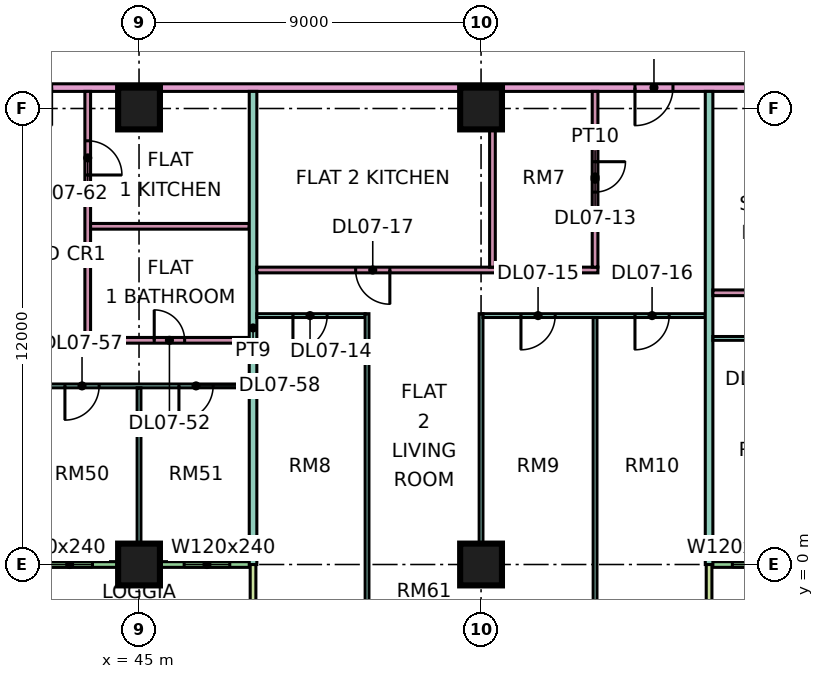
"""IFC4 building model, lengths in metres.
Left out: names, types, materials, properties, quantities, classifications, styles, units other than length and angle.
Written with IfcOpenShell. Run it as: python <this file> out.ifc"""

import sys

from ifc_helpers import new_model, si_unit, direction, frame, frame_2d, origin, origin_2d, place, context, subcontext, project, spatial, rectangle, extrude, element, fill, save


model = new_model("IFC4")
c1 = context("Model", 3, precision=1e-05, world=origin(), true_north=direction((0.0, 1.0)))
c2 = subcontext(c1, "Body", "Model", "MODEL_VIEW")
j1 = project(units=[si_unit("LENGTHUNIT", "METRE"), si_unit("PLANEANGLEUNIT", "RADIAN")], contexts=[c1])
p1 = place(None, origin())
s1 = spatial("IfcSite", under=j1, at=p1, CompositionType="ELEMENT")
p2 = place(p1, origin())
s2 = spatial("IfcBuilding", under=s1, at=p2, CompositionType="ELEMENT")
p3 = place(p2, frame((0.0, 0.0, 41.4)))
s3 = spatial("IfcBuildingStorey", under=s2, at=p3, CompositionType="ELEMENT", Elevation=41.4)
for number, where, z_axis, x_axis in (
    (1, (45.0, 0.0, 0.0), (0.0, 0.0, 1.0), (1.0, 0.0, 0.0)),
    (2, (45.0, 12.0, 0.0), (0.0, 0.0, 1.0), (1.0, 0.0, 0.0)),
    (3, (54.0, 0.0, 0.0), (0.0, 0.0, 1.0), (1.0, 0.0, 0.0)),
    (4, (54.0, 12.0, 0.0), (0.0, 0.0, 1.0), (1.0, 0.0, 0.0)),
):
    element("IfcColumn", number, at=place(p3, frame(where, z_axis=z_axis, x_axis=x_axis)), inside=s3, PredefinedType="COLUMN", context=c2, shape_type="SweptSolid", body=[
        extrude(rectangle(XDim=1.1, YDim=1.1, at=origin_2d()), origin(), (0.0, 0.0, 1.0), 3.75),
    ])
p4 = place(p3, frame((36.075, 0.0, 0.0), z_axis=(0.0, 0.0, 1.0), x_axis=(1.0, 0.0, 0.0)))
e5 = element("IfcWall", 5, at=p4, inside=s3, PredefinedType="SOLIDWALL", context=c2, shape_type="SweptSolid", body=[
    extrude(rectangle(XDim=11.85, YDim=0.15, at=frame_2d((5.925, 0.0))), origin(), (0.0, 0.0, 1.0), 3.35),
])
p5 = place(p4, frame((2.35, 0.0, 0.0)))
e6 = element("IfcOpeningElement", 6, at=p5, cuts=e5, PredefinedType="OPENING", context=c2, shape_type="SweptSolid", body=[
    extrude(rectangle(XDim=1.8, YDim=2.4, at=frame_2d((0.9, 1.2))), frame((0.0, 0.085, 0.0), z_axis=(0.0, -1.0, 0.0), x_axis=(1.0, 0.0, 0.0)), (0.0, 0.0, 1.0), 0.17),
])
p6 = place(p4, frame((6.5, 0.0, 0.45)))
e7 = element("IfcOpeningElement", 7, at=p6, cuts=e5, PredefinedType="OPENING", context=c2, shape_type="SweptSolid", body=[
    extrude(rectangle(XDim=1.2, YDim=2.4, at=frame_2d((0.6, 1.2))), frame((0.0, 0.085, 0.0), z_axis=(0.0, -1.0, 0.0), x_axis=(1.0, 0.0, 0.0)), (0.0, 0.0, 1.0), 0.17),
])
p7 = place(p4, frame((10.113, 0.0, 0.45)))
e8 = element("IfcOpeningElement", 8, at=p7, cuts=e5, PredefinedType="OPENING", context=c2, shape_type="SweptSolid", body=[
    extrude(rectangle(XDim=1.2, YDim=2.4, at=frame_2d((0.6, 1.2))), frame((0.0, 0.085, 0.0), z_axis=(0.0, -1.0, 0.0), x_axis=(1.0, 0.0, 0.0)), (0.0, 0.0, 1.0), 0.17),
])
p8 = place(p3, frame((48.0, -1.5, 0.0), z_axis=(0.0, 0.0, 1.0), x_axis=(0.0, 1.0, 0.0)))
e9 = element("IfcWall", 9, at=p8, inside=s3, PredefinedType="SOLIDWALL", context=c2, shape_type="SweptSolid", body=[
    extrude(rectangle(XDim=1.5, YDim=0.15, at=frame_2d((0.75, 0.0))), origin(), (0.0, 0.0, 1.0), 3.35),
])
p9 = place(p3, frame((60.075, 0.0, 0.0), z_axis=(0.0, 0.0, 1.0), x_axis=(1.0, 0.0, 0.0)))
e10 = element("IfcWall", 10, at=p9, inside=s3, PredefinedType="SOLIDWALL", context=c2, shape_type="SweptSolid", body=[
    extrude(rectangle(XDim=10.35, YDim=0.15, at=frame_2d((5.175, 0.0))), origin(), (0.0, 0.0, 1.0), 3.35),
])
p10 = place(p9, frame((0.538, 0.0, 0.45)))
e11 = element("IfcOpeningElement", 11, at=p10, cuts=e10, PredefinedType="OPENING", context=c2, shape_type="SweptSolid", body=[
    extrude(rectangle(XDim=1.2, YDim=2.4, at=frame_2d((0.6, 1.2))), frame((0.0, 0.085, 0.0), z_axis=(0.0, -1.0, 0.0), x_axis=(1.0, 0.0, 0.0)), (0.0, 0.0, 1.0), 0.17),
])
p11 = place(p9, frame((5.35, 0.0, 0.0)))
e12 = element("IfcOpeningElement", 12, at=p11, cuts=e10, PredefinedType="OPENING", context=c2, shape_type="SweptSolid", body=[
    extrude(rectangle(XDim=1.8, YDim=2.4, at=frame_2d((0.9, 1.2))), frame((0.0, 0.085, 0.0), z_axis=(0.0, -1.0, 0.0), x_axis=(1.0, 0.0, 0.0)), (0.0, 0.0, 1.0), 0.17),
])
p12 = place(p9, frame((9.188, 0.0, 0.45)))
e13 = element("IfcOpeningElement", 13, at=p12, cuts=e10, PredefinedType="OPENING", context=c2, shape_type="SweptSolid", body=[
    extrude(rectangle(XDim=0.9, YDim=2.4, at=frame_2d((0.45, 1.2))), frame((0.0, 0.085, 0.0), z_axis=(0.0, -1.0, 0.0), x_axis=(1.0, 0.0, 0.0)), (0.0, 0.0, 1.0), 0.17),
])
p13 = place(p3, frame((60.0, -1.5, 0.0), z_axis=(0.0, 0.0, 1.0), x_axis=(0.0, 1.0, 0.0)))
e14 = element("IfcWall", 14, at=p13, inside=s3, PredefinedType="SOLIDWALL", context=c2, shape_type="SweptSolid", body=[
    extrude(rectangle(XDim=1.5, YDim=0.15, at=frame_2d((0.75, 0.0))), origin(), (0.0, 0.0, 1.0), 3.35),
])
p14 = place(p3, frame((33.05, 4.7, 0.0), z_axis=(0.0, 0.0, 1.0), x_axis=(1.0, 0.0, 0.0)))
e15 = element("IfcWall", 15, at=p14, inside=s3, PredefinedType="PARTITIONING", context=c2, shape_type="SweptSolid", body=[
    extrude(rectangle(XDim=14.85, YDim=0.1, at=frame_2d((7.425, 0.0))), origin(), (0.0, 0.0, 1.0), 3.35),
])
p15 = place(p14, frame((10.0, 0.0, 0.0)))
e16 = element("IfcOpeningElement", 16, at=p15, cuts=e15, PredefinedType="OPENING", context=c2, shape_type="SweptSolid", body=[
    extrude(rectangle(XDim=0.9, YDim=2.1, at=frame_2d((0.45, 1.05))), frame((0.0, 0.06, 0.0), z_axis=(0.0, -1.0, 0.0), x_axis=(1.0, 0.0, 0.0)), (0.0, 0.0, 1.0), 0.12),
])
p16 = place(p14, frame((13.0, 0.0, 0.0)))
e17 = element("IfcOpeningElement", 17, at=p16, cuts=e15, PredefinedType="OPENING", context=c2, shape_type="SweptSolid", body=[
    extrude(rectangle(XDim=0.9, YDim=2.1, at=frame_2d((0.45, 1.05))), frame((0.0, 0.06, 0.0), z_axis=(0.0, -1.0, 0.0), x_axis=(1.0, 0.0, 0.0)), (0.0, 0.0, 1.0), 0.12),
])
p17 = place(p14, frame((4.0, 0.0, 0.0)))
e18 = element("IfcOpeningElement", 18, at=p17, cuts=e15, PredefinedType="OPENING", context=c2, shape_type="SweptSolid", body=[
    extrude(rectangle(XDim=0.9, YDim=2.1, at=frame_2d((0.45, 1.05))), frame((0.0, 0.06, 0.0), z_axis=(0.0, -1.0, 0.0), x_axis=(1.0, 0.0, 0.0)), (0.0, 0.0, 1.0), 0.12),
])
p18 = place(p3, frame((40.65, 12.55, 0.0), z_axis=(0.0, 0.0, 1.0), x_axis=(1.0, 0.0, 0.0)))
e19 = element("IfcWall", 19, at=p18, inside=s3, PredefinedType="PARTITIONING", context=c2, shape_type="SweptSolid", body=[
    extrude(rectangle(XDim=31.276, YDim=0.2, at=frame_2d((15.638, 0.0))), origin(), (0.0, 0.0, 1.0), 3.35),
])
p19 = place(p18, frame((17.4, 0.0, 0.0)))
e20 = element("IfcOpeningElement", 20, at=p19, cuts=e19, PredefinedType="OPENING", context=c2, shape_type="SweptSolid", body=[
    extrude(rectangle(XDim=1.0, YDim=2.1, at=frame_2d((0.5, 1.05))), frame((0.0, 0.11, 0.0), z_axis=(0.0, -1.0, 0.0), x_axis=(1.0, 0.0, 0.0)), (0.0, 0.0, 1.0), 0.22),
])
p20 = place(p18, frame((26.25, 0.0, 0.0)))
e21 = element("IfcOpeningElement", 21, at=p20, cuts=e19, PredefinedType="OPENING", context=c2, shape_type="SweptSolid", body=[
    extrude(rectangle(XDim=1.0, YDim=2.1, at=frame_2d((0.5, 1.05))), frame((0.0, 0.11, 0.0), z_axis=(0.0, -1.0, 0.0), x_axis=(1.0, 0.0, 0.0)), (0.0, 0.0, 1.0), 0.22),
])
p21 = place(p18, frame((1.05, 0.0, 0.0)))
e22 = element("IfcOpeningElement", 22, at=p21, cuts=e19, PredefinedType="OPENING", context=c2, shape_type="SweptSolid", body=[
    extrude(rectangle(XDim=1.0, YDim=2.1, at=frame_2d((0.5, 1.05))), frame((0.0, 0.11, 0.0), z_axis=(0.0, -1.0, 0.0), x_axis=(1.0, 0.0, 0.0)), (0.0, 0.0, 1.0), 0.22),
])
p22 = place(p3, frame((43.65, 5.825, 0.0), z_axis=(0.0, 0.0, 1.0), x_axis=(0.0, 1.0, 0.0)))
e23 = element("IfcWall", 23, at=p22, inside=s3, PredefinedType="PARTITIONING", context=c2, shape_type="SweptSolid", body=[
    extrude(rectangle(XDim=6.625, YDim=0.15, at=frame_2d((3.312, 0.0))), origin(), (0.0, 0.0, 1.0), 3.35),
])
p23 = place(p22, frame((4.425, 0.0, 0.0)))
e24 = element("IfcOpeningElement", 24, at=p23, cuts=e23, PredefinedType="OPENING", context=c2, shape_type="SweptSolid", body=[
    extrude(rectangle(XDim=0.9, YDim=2.1, at=frame_2d((0.45, 1.05))), frame((0.0, 0.085, 0.0), z_axis=(0.0, -1.0, 0.0), x_axis=(1.0, 0.0, 0.0)), (0.0, 0.0, 1.0), 0.17),
])
p24 = place(p3, frame((43.725, 5.9, 0.0), z_axis=(0.0, 0.0, 1.0), x_axis=(1.0, 0.0, 0.0)))
e25 = element("IfcWall", 25, at=p24, inside=s3, PredefinedType="PARTITIONING", context=c2, shape_type="SweptSolid", body=[
    extrude(rectangle(XDim=4.175, YDim=0.15, at=frame_2d((2.087, 0.0))), origin(), (0.0, 0.0, 1.0), 3.35),
])
p25 = place(p24, frame((1.675, 0.0, 0.0)))
e26 = element("IfcOpeningElement", 26, at=p25, cuts=e25, PredefinedType="OPENING", context=c2, shape_type="SweptSolid", body=[
    extrude(rectangle(XDim=0.8, YDim=2.1, at=frame_2d((0.4, 1.05))), frame((0.0, 0.085, 0.0), z_axis=(0.0, -1.0, 0.0), x_axis=(1.0, 0.0, 0.0)), (0.0, 0.0, 1.0), 0.17),
])
p26 = place(p3, frame((43.725, 8.9, 0.0), z_axis=(0.0, 0.0, 1.0), x_axis=(1.0, 0.0, 0.0)))
e27 = element("IfcWall", 27, at=p26, inside=s3, PredefinedType="PARTITIONING", context=c2, shape_type="SweptSolid", body=[
    extrude(rectangle(XDim=4.175, YDim=0.15, at=frame_2d((2.087, 0.0))), origin(), (0.0, 0.0, 1.0), 3.35),
])
p27 = place(p3, frame((45.0, 0.074, 0.0), z_axis=(0.0, 0.0, 1.0), x_axis=(0.0, 1.0, 0.0)))
e28 = element("IfcWall", 28, at=p27, inside=s3, PredefinedType="PARTITIONING", context=c2, shape_type="SweptSolid", body=[
    extrude(rectangle(XDim=4.576, YDim=0.1, at=frame_2d((2.288, 0.0))), origin(), (0.0, 0.0, 1.0), 3.35),
])
p28 = place(p3, frame((48.0, 0.0, 0.0), z_axis=(0.0, 0.0, 1.0), x_axis=(0.0, 1.0, 0.0)))
e29 = element("IfcWall", 29, at=p28, inside=s3, PredefinedType="PARTITIONING", context=c2, shape_type="SweptSolid", body=[
    extrude(rectangle(XDim=12.45, YDim=0.2, at=frame_2d((6.225, 0.0))), origin(), (0.0, 0.0, 1.0), 3.35),
])
p29 = place(p3, frame((48.1, 6.55, 0.0), z_axis=(0.0, 0.0, 1.0), x_axis=(1.0, 0.0, 0.0)))
e30 = element("IfcWall", 30, at=p29, inside=s3, PredefinedType="PARTITIONING", context=c2, shape_type="SweptSolid", body=[
    extrude(rectangle(XDim=2.85, YDim=0.1, at=frame_2d((1.425, 0.0))), origin(), (0.0, 0.0, 1.0), 3.35),
])
p30 = place(p29, frame((0.95, 0.0, 0.0)))
e31 = element("IfcOpeningElement", 31, at=p30, cuts=e30, PredefinedType="OPENING", context=c2, shape_type="SweptSolid", body=[
    extrude(rectangle(XDim=0.9, YDim=2.1, at=frame_2d((0.45, 1.05))), frame((0.0, 0.06, 0.0), z_axis=(0.0, -1.0, 0.0), x_axis=(1.0, 0.0, 0.0)), (0.0, 0.0, 1.0), 0.12),
])
p31 = place(p3, frame((48.1, 7.75, 0.0), z_axis=(0.0, 0.0, 1.0), x_axis=(1.0, 0.0, 0.0)))
e32 = element("IfcWall", 32, at=p31, inside=s3, PredefinedType="PARTITIONING", context=c2, shape_type="SweptSolid", body=[
    extrude(rectangle(XDim=8.975, YDim=0.15, at=frame_2d((4.487, 0.0))), origin(), (0.0, 0.0, 1.0), 3.35),
])
p32 = place(p31, frame((2.6, 0.0, 0.0)))
e33 = element("IfcOpeningElement", 33, at=p32, cuts=e32, PredefinedType="OPENING", context=c2, shape_type="SweptSolid", body=[
    extrude(rectangle(XDim=0.9, YDim=2.1, at=frame_2d((0.45, 1.05))), frame((0.0, 0.085, 0.0), z_axis=(0.0, -1.0, 0.0), x_axis=(1.0, 0.0, 0.0)), (0.0, 0.0, 1.0), 0.17),
])
p33 = place(p3, frame((51.0, -1.35, 0.0), z_axis=(0.0, 0.0, 1.0), x_axis=(0.0, 1.0, 0.0)))
e34 = element("IfcWall", 34, at=p33, inside=s3, PredefinedType="PARTITIONING", context=c2, shape_type="SweptSolid", body=[
    extrude(rectangle(XDim=7.95, YDim=0.1, at=frame_2d((3.975, 0.0))), origin(), (0.0, 0.0, 1.0), 3.35),
])
p34 = place(p3, frame((54.0, 0.0, 0.0), z_axis=(0.0, 0.0, 1.0), x_axis=(0.0, 1.0, 0.0)))
e35 = element("IfcWall", 35, at=p34, inside=s3, PredefinedType="PARTITIONING", context=c2, shape_type="SweptSolid", body=[
    extrude(rectangle(XDim=6.6, YDim=0.1, at=frame_2d((3.3, 0.0))), origin(), (0.0, 0.0, 1.0), 3.35),
])
p35 = place(p3, frame((54.05, 6.55, 0.0), z_axis=(0.0, 0.0, 1.0), x_axis=(1.0, 0.0, 0.0)))
e36 = element("IfcWall", 36, at=p35, inside=s3, PredefinedType="PARTITIONING", context=c2, shape_type="SweptSolid", body=[
    extrude(rectangle(XDim=5.85, YDim=0.1, at=frame_2d((2.925, 0.0))), origin(), (0.0, 0.0, 1.0), 3.35),
])
p36 = place(p35, frame((1.0, 0.0, 0.0)))
e37 = element("IfcOpeningElement", 37, at=p36, cuts=e36, PredefinedType="OPENING", context=c2, shape_type="SweptSolid", body=[
    extrude(rectangle(XDim=0.9, YDim=2.1, at=frame_2d((0.45, 1.05))), frame((0.0, 0.06, 0.0), z_axis=(0.0, -1.0, 0.0), x_axis=(1.0, 0.0, 0.0)), (0.0, 0.0, 1.0), 0.12),
])
p37 = place(p35, frame((4.0, 0.0, 0.0)))
e38 = element("IfcOpeningElement", 38, at=p37, cuts=e36, PredefinedType="OPENING", context=c2, shape_type="SweptSolid", body=[
    extrude(rectangle(XDim=0.9, YDim=2.1, at=frame_2d((0.45, 1.05))), frame((0.0, 0.06, 0.0), z_axis=(0.0, -1.0, 0.0), x_axis=(1.0, 0.0, 0.0)), (0.0, 0.0, 1.0), 0.12),
])
p38 = place(p3, frame((54.3, 7.825, 0.0), z_axis=(0.0, 0.0, 1.0), x_axis=(0.0, 1.0, 0.0)))
e39 = element("IfcWall", 39, at=p38, inside=s3, PredefinedType="PARTITIONING", context=c2, shape_type="SweptSolid", body=[
    extrude(rectangle(XDim=4.625, YDim=0.15, at=frame_2d((2.312, 0.0))), origin(), (0.0, 0.0, 1.0), 3.35),
])
p39 = place(p3, frame((57.0, -1.351, 0.0), z_axis=(0.0, 0.0, 1.0), x_axis=(0.0, 1.0, 0.0)))
e40 = element("IfcWall", 40, at=p39, inside=s3, PredefinedType="PARTITIONING", context=c2, shape_type="SweptSolid", body=[
    extrude(rectangle(XDim=7.851, YDim=0.1, at=frame_2d((3.926, 0.0))), origin(), (0.0, 0.0, 1.0), 3.35),
])
p40 = place(p3, frame((57.0, 7.825, 0.0), z_axis=(0.0, 0.0, 1.0), x_axis=(0.0, 1.0, 0.0)))
e41 = element("IfcWall", 41, at=p40, inside=s3, PredefinedType="PARTITIONING", context=c2, shape_type="SweptSolid", body=[
    extrude(rectangle(XDim=4.625, YDim=0.15, at=frame_2d((2.312, 0.0))), origin(), (0.0, 0.0, 1.0), 3.35),
])
p41 = place(p40, frame((1.975, 0.0, 0.0)))
e42 = element("IfcOpeningElement", 42, at=p41, cuts=e41, PredefinedType="OPENING", context=c2, shape_type="SweptSolid", body=[
    extrude(rectangle(XDim=0.8, YDim=2.1, at=frame_2d((0.4, 1.05))), frame((0.0, 0.085, 0.0), z_axis=(0.0, -1.0, 0.0), x_axis=(1.0, 0.0, 0.0)), (0.0, 0.0, 1.0), 0.17),
])
p42 = place(p3, frame((60.0, 0.0, 0.0), z_axis=(0.0, 0.0, 1.0), x_axis=(0.0, 1.0, 0.0)))
e43 = element("IfcWall", 43, at=p42, inside=s3, PredefinedType="PARTITIONING", context=c2, shape_type="SweptSolid", body=[
    extrude(rectangle(XDim=12.45, YDim=0.2, at=frame_2d((6.225, 0.0))), origin(), (0.0, 0.0, 1.0), 3.35),
])
p43 = place(p3, frame((60.1, 5.95, 0.0), z_axis=(0.0, 0.0, 1.0), x_axis=(1.0, 0.0, 0.0)))
e44 = element("IfcWall", 44, at=p43, inside=s3, PredefinedType="PARTITIONING", context=c2, shape_type="SweptSolid", body=[
    extrude(rectangle(XDim=2.85, YDim=0.1, at=frame_2d((1.425, 0.0))), origin(), (0.0, 0.0, 1.0), 3.35),
])
p44 = place(p43, frame((0.95, 0.0, 0.0)))
e45 = element("IfcOpeningElement", 45, at=p44, cuts=e44, PredefinedType="OPENING", context=c2, shape_type="SweptSolid", body=[
    extrude(rectangle(XDim=0.9, YDim=2.1, at=frame_2d((0.45, 1.05))), frame((0.0, 0.06, 0.0), z_axis=(0.0, -1.0, 0.0), x_axis=(1.0, 0.0, 0.0)), (0.0, 0.0, 1.0), 0.12),
])
p45 = place(p3, frame((60.1, 7.15, 0.0), z_axis=(0.0, 0.0, 1.0), x_axis=(1.0, 0.0, 0.0)))
e46 = element("IfcWall", 46, at=p45, inside=s3, PredefinedType="PARTITIONING", context=c2, shape_type="SweptSolid", body=[
    extrude(rectangle(XDim=5.675, YDim=0.15, at=frame_2d((2.837, 0.0))), origin(), (0.0, 0.0, 1.0), 3.35),
])
p46 = place(p45, frame((1.1, 0.0, 0.0)))
e47 = element("IfcOpeningElement", 47, at=p46, cuts=e46, PredefinedType="OPENING", context=c2, shape_type="SweptSolid", body=[
    extrude(rectangle(XDim=0.9, YDim=2.1, at=frame_2d((0.45, 1.05))), frame((0.0, 0.085, 0.0), z_axis=(0.0, -1.0, 0.0), x_axis=(1.0, 0.0, 0.0)), (0.0, 0.0, 1.0), 0.17),
])
p47 = place(p6, origin())
e48 = element("IfcWindow", 48, at=p47, inside=s3, PartitioningType="SINGLE_PANEL", PredefinedType="WINDOW", context=c2, shape_type="SweptSolid", body=[
    extrude(rectangle(XDim=1.2, YDim=2.4, at=frame_2d((0.6, 1.2))), frame((0.0, 0.03, 0.0), z_axis=(0.0, -1.0, 0.0), x_axis=(1.0, 0.0, 0.0)), (0.0, 0.0, 1.0), 0.06),
])
fill(e7, e48)
p48 = place(p7, origin())
e49 = element("IfcWindow", 49, at=p48, inside=s3, PartitioningType="SINGLE_PANEL", PredefinedType="WINDOW", context=c2, shape_type="SweptSolid", body=[
    extrude(rectangle(XDim=1.2, YDim=2.4, at=frame_2d((0.6, 1.2))), frame((0.0, 0.03, 0.0), z_axis=(0.0, -1.0, 0.0), x_axis=(1.0, 0.0, 0.0)), (0.0, 0.0, 1.0), 0.06),
])
fill(e8, e49)
p49 = place(p10, origin())
e50 = element("IfcWindow", 50, at=p49, inside=s3, PartitioningType="SINGLE_PANEL", PredefinedType="WINDOW", context=c2, shape_type="SweptSolid", body=[
    extrude(rectangle(XDim=1.2, YDim=2.4, at=frame_2d((0.6, 1.2))), frame((0.0, 0.03, 0.0), z_axis=(0.0, -1.0, 0.0), x_axis=(1.0, 0.0, 0.0)), (0.0, 0.0, 1.0), 0.06),
])
fill(e11, e50)
p50 = place(p41, origin())
e51 = element("IfcDoor", 51, at=p50, inside=s3, OperationType="SINGLE_SWING_RIGHT", PredefinedType="DOOR", context=c2, shape_type="SweptSolid", body=[
    extrude(rectangle(XDim=0.8, YDim=2.1, at=frame_2d((0.4, 1.05))), frame((0.0, 0.025, 0.0), z_axis=(0.0, -1.0, 0.0), x_axis=(1.0, 0.0, 0.0)), (0.0, 0.0, 1.0), 0.05),
])
fill(e42, e51)
p51 = place(p30, frame((0.9, 0.0, 0.0), z_axis=(0.0, 0.0, 1.0), x_axis=(-1.0, 0.0, 0.0)))
e52 = element("IfcDoor", 52, at=p51, inside=s3, OperationType="SINGLE_SWING_LEFT", PredefinedType="DOOR", context=c2, shape_type="SweptSolid", body=[
    extrude(rectangle(XDim=0.9, YDim=2.1, at=frame_2d((0.45, 1.05))), frame((0.0, 0.025, 0.0), z_axis=(0.0, -1.0, 0.0), x_axis=(1.0, 0.0, 0.0)), (0.0, 0.0, 1.0), 0.05),
])
fill(e31, e52)
p52 = place(p36, frame((0.9, 0.0, 0.0), z_axis=(0.0, 0.0, 1.0), x_axis=(-1.0, 0.0, 0.0)))
e53 = element("IfcDoor", 53, at=p52, inside=s3, OperationType="SINGLE_SWING_LEFT", PredefinedType="DOOR", context=c2, shape_type="SweptSolid", body=[
    extrude(rectangle(XDim=0.9, YDim=2.1, at=frame_2d((0.45, 1.05))), frame((0.0, 0.025, 0.0), z_axis=(0.0, -1.0, 0.0), x_axis=(1.0, 0.0, 0.0)), (0.0, 0.0, 1.0), 0.05),
])
fill(e37, e53)
p53 = place(p37, frame((0.9, 0.0, 0.0), z_axis=(0.0, 0.0, 1.0), x_axis=(-1.0, 0.0, 0.0)))
e54 = element("IfcDoor", 54, at=p53, inside=s3, OperationType="SINGLE_SWING_LEFT", PredefinedType="DOOR", context=c2, shape_type="SweptSolid", body=[
    extrude(rectangle(XDim=0.9, YDim=2.1, at=frame_2d((0.45, 1.05))), frame((0.0, 0.025, 0.0), z_axis=(0.0, -1.0, 0.0), x_axis=(1.0, 0.0, 0.0)), (0.0, 0.0, 1.0), 0.05),
])
fill(e38, e54)
p54 = place(p32, origin())
e55 = element("IfcDoor", 55, at=p54, inside=s3, OperationType="SINGLE_SWING_RIGHT", PredefinedType="DOOR", context=c2, shape_type="SweptSolid", body=[
    extrude(rectangle(XDim=0.9, YDim=2.1, at=frame_2d((0.45, 1.05))), frame((0.0, 0.025, 0.0), z_axis=(0.0, -1.0, 0.0), x_axis=(1.0, 0.0, 0.0)), (0.0, 0.0, 1.0), 0.05),
])
fill(e33, e55)
p55 = place(p19, frame((1.0, 0.0, 0.0), z_axis=(0.0, 0.0, 1.0), x_axis=(-1.0, 0.0, 0.0)))
e56 = element("IfcDoor", 56, at=p55, inside=s3, OperationType="SINGLE_SWING_LEFT", PredefinedType="DOOR", context=c2, shape_type="SweptSolid", body=[
    extrude(rectangle(XDim=1.0, YDim=2.1, at=frame_2d((0.5, 1.05))), frame((0.0, 0.025, 0.0), z_axis=(0.0, -1.0, 0.0), x_axis=(1.0, 0.0, 0.0)), (0.0, 0.0, 1.0), 0.05),
])
fill(e20, e56)
p56 = place(p25, origin())
e57 = element("IfcDoor", 57, at=p56, inside=s3, OperationType="SINGLE_SWING_LEFT", PredefinedType="DOOR", context=c2, shape_type="SweptSolid", body=[
    extrude(rectangle(XDim=0.8, YDim=2.1, at=frame_2d((0.4, 1.05))), frame((0.0, 0.025, 0.0), z_axis=(0.0, -1.0, 0.0), x_axis=(1.0, 0.0, 0.0)), (0.0, 0.0, 1.0), 0.05),
])
fill(e26, e57)
p57 = place(p15, frame((0.9, 0.0, 0.0), z_axis=(0.0, 0.0, 1.0), x_axis=(-1.0, 0.0, 0.0)))
e58 = element("IfcDoor", 58, at=p57, inside=s3, OperationType="SINGLE_SWING_LEFT", PredefinedType="DOOR", context=c2, shape_type="SweptSolid", body=[
    extrude(rectangle(XDim=0.9, YDim=2.1, at=frame_2d((0.45, 1.05))), frame((0.0, 0.025, 0.0), z_axis=(0.0, -1.0, 0.0), x_axis=(1.0, 0.0, 0.0)), (0.0, 0.0, 1.0), 0.05),
])
fill(e16, e58)
p58 = place(p16, frame((0.9, 0.0, 0.0), z_axis=(0.0, 0.0, 1.0), x_axis=(-1.0, 0.0, 0.0)))
e59 = element("IfcDoor", 59, at=p58, inside=s3, OperationType="SINGLE_SWING_LEFT", PredefinedType="DOOR", context=c2, shape_type="SweptSolid", body=[
    extrude(rectangle(XDim=0.9, YDim=2.1, at=frame_2d((0.45, 1.05))), frame((0.0, 0.025, 0.0), z_axis=(0.0, -1.0, 0.0), x_axis=(1.0, 0.0, 0.0)), (0.0, 0.0, 1.0), 0.05),
])
fill(e17, e59)
p59 = place(p23, frame((0.9, 0.0, 0.0), z_axis=(0.0, 0.0, 1.0), x_axis=(-1.0, 0.0, 0.0)))
e60 = element("IfcDoor", 60, at=p59, inside=s3, OperationType="SINGLE_SWING_LEFT", PredefinedType="DOOR", context=c2, shape_type="SweptSolid", body=[
    extrude(rectangle(XDim=0.9, YDim=2.1, at=frame_2d((0.45, 1.05))), frame((0.0, 0.025, 0.0), z_axis=(0.0, -1.0, 0.0), x_axis=(1.0, 0.0, 0.0)), (0.0, 0.0, 1.0), 0.05),
])
fill(e24, e60)
save(model, sys.argv[1])
